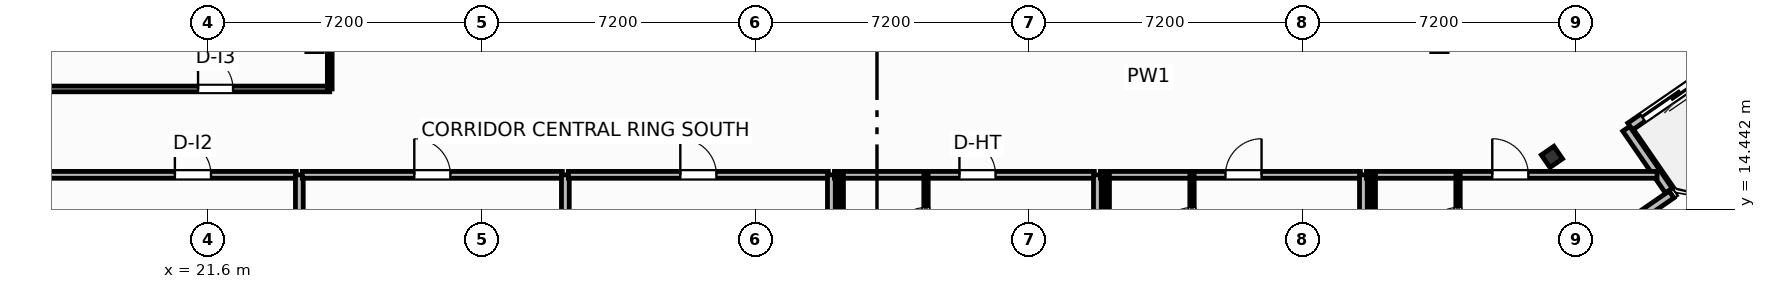
"""IFC4 building model, lengths in metres.
Left out: names, types, materials, properties, quantities, classifications, styles, units other than length and angle.
Written with IfcOpenShell. Run it as: python <this file> out.ifc"""

import sys

from ifc_helpers import new_model, si_unit, direction, frame, frame_2d, origin, origin_2d, place, context, subcontext, project, spatial, rectangle, i_section, extrude, element, fill, save


model = new_model("IFC4")
c1 = context("Model", 3, precision=1e-05, world=origin(), true_north=direction((0.0, 1.0)))
c2 = subcontext(c1, "Body", "Model", "MODEL_VIEW")
j1 = project(units=[si_unit("LENGTHUNIT", "METRE"), si_unit("PLANEANGLEUNIT", "RADIAN")], contexts=[c1])
p1 = place(None, origin())
s1 = spatial("IfcSite", under=j1, at=p1, CompositionType="ELEMENT")
p2 = place(p1, origin())
s2 = spatial("IfcBuilding", under=s1, at=p2, CompositionType="ELEMENT")
p3 = place(p2, frame((0.0, 0.0, 265.6)))
s3 = spatial("IfcBuildingStorey", under=s2, at=p3, CompositionType="ELEMENT", Elevation=265.6)
p4 = place(p3, frame((56.96, 15.823, 0.0), z_axis=(0.0, 0.0, 1.0), x_axis=(0.823532597628, 0.567268949127, 0.0)))
e1 = element("IfcColumn", 1, at=p4, inside=s3, PredefinedType="COLUMN", context=c2, shape_type="SweptSolid", body=[
    extrude(i_section(OverallWidth=0.401, OverallDepth=0.399, WebThickness=0.025, FlangeThickness=0.04, FilletRadius=0.022, at=origin_2d()), origin(), (0.0, 0.0, 1.0), 3.7),
])
p5 = place(p3, frame((63.605, 19.78, 0.0), z_axis=(0.0, 0.0, 1.0), x_axis=(-0.823541290762, -0.567256328665, 0.0)))
e2 = element("IfcWall", 2, at=p5, inside=s3, PredefinedType="SOLIDWALL", context=c2, shape_type="SweptSolid", body=[
    extrude(rectangle(XDim=5.567, YDim=0.22, at=frame_2d((2.784, 0.0))), origin(), (0.0, 0.0, 1.0), 2.73),
])
p6 = place(p5, frame((3.067, 0.0, 0.0)))
e3 = element("IfcOpeningElement", 3, at=p6, cuts=e2, PredefinedType="OPENING", context=c2, shape_type="SweptSolid", body=[
    extrude(rectangle(XDim=2.1, YDim=2.3, at=frame_2d((1.05, 1.15))), frame((0.0, 0.12, 0.0), z_axis=(0.0, -1.0, 0.0), x_axis=(1.0, 0.0, 0.0)), (0.0, 0.0, 1.0), 0.24),
])
p7 = place(p3, frame((53.49, 10.275, 0.0), z_axis=(0.0, 0.0, 1.0), x_axis=(0.823530942962, 0.56727135128, 0.0)))
e4 = element("IfcWall", 4, at=p7, inside=s3, PredefinedType="SOLIDWALL", context=c2, shape_type="SweptSolid", body=[
    extrude(rectangle(XDim=8.035, YDim=0.22, at=frame_2d((4.018, 0.0))), origin(), (0.0, 0.0, 1.0), 2.73),
])
p8 = place(p7, frame((2.968, 0.0, 0.8)))
e5 = element("IfcOpeningElement", 5, at=p8, cuts=e4, PredefinedType="OPENING", context=c2, shape_type="SweptSolid", body=[
    extrude(rectangle(XDim=2.1, YDim=1.75, at=frame_2d((1.05, 0.875))), frame((0.0, 0.12, 0.0), z_axis=(0.0, -1.0, 0.0), x_axis=(1.0, 0.0, 0.0)), (0.0, 0.0, 1.0), 0.24),
])
p9 = place(p3, frame((60.036, 14.936, 0.0), z_axis=(0.0, 0.0, 1.0), x_axis=(-0.567273565974, 0.823529417415, 0.0)))
e6 = element("IfcWall", 6, at=p9, inside=s3, PredefinedType="SOLIDWALL", context=c2, shape_type="SweptSolid", body=[
    extrude(rectangle(XDim=1.975, YDim=0.22, at=frame_2d((0.988, 0.0))), origin(), (0.0, 0.0, 1.0), 2.73),
])
p10 = place(p3, frame((5.0, 17.61, 0.0), z_axis=(0.0, 0.0, 1.0), x_axis=(1.0, 0.0, 0.0)))
e7 = element("IfcWall", 7, at=p10, inside=s3, PredefinedType="PARTITIONING", context=c2, shape_type="SweptSolid", body=[
    extrude(rectangle(XDim=19.8, YDim=0.15, at=frame_2d((9.9, 0.0))), origin(), (0.0, 0.0, 1.0), 2.739),
])
p11 = place(p10, frame((16.335, 0.0, 0.0)))
e8 = element("IfcOpeningElement", 8, at=p11, cuts=e7, PredefinedType="OPENING", context=c2, shape_type="SweptSolid", body=[
    extrude(rectangle(XDim=0.92, YDim=2.05, at=frame_2d((0.46, 1.025))), frame((0.0, 0.085, 0.0), z_axis=(0.0, -1.0, 0.0), x_axis=(1.0, 0.0, 0.0)), (0.0, 0.0, 1.0), 0.17),
])
p12 = place(p3, frame((24.8, 17.61, 0.0), z_axis=(0.0, 0.0, 1.0), x_axis=(0.0, 1.0, 0.0)))
e9 = element("IfcWall", 9, at=p12, inside=s3, PredefinedType="PARTITIONING", context=c2, shape_type="SweptSolid", body=[
    extrude(rectangle(XDim=1.63, YDim=0.125, at=frame_2d((0.815, 0.0))), origin(), (0.0, 0.0, 1.0), 3.45),
])
p13 = place(p3, frame((6.071, 15.35, 0.0), z_axis=(0.0, 0.0, 1.0), x_axis=(1.0, 0.0, 0.0)))
e10 = element("IfcWall", 10, at=p13, inside=s3, PredefinedType="PARTITIONING", context=c2, shape_type="SweptSolid", body=[
    extrude(rectangle(XDim=17.849, YDim=0.18, at=frame_2d((8.924, 0.0))), origin(), (0.0, 0.0, 1.0), 3.45),
])
p14 = place(p13, frame((14.654, 0.0, 0.0)))
e11 = element("IfcOpeningElement", 11, at=p14, cuts=e10, PredefinedType="OPENING", context=c2, shape_type="SweptSolid", body=[
    extrude(rectangle(XDim=0.95, YDim=2.05, at=frame_2d((0.475, 1.025))), frame((0.0, 0.1, 0.0), z_axis=(0.0, -1.0, 0.0), x_axis=(1.0, 0.0, 0.0)), (0.0, 0.0, 1.0), 0.2),
])
p15 = place(p3, frame((24.0, -4.0, 0.0), z_axis=(0.0, 0.0, 1.0), x_axis=(0.0, 1.0, 0.0)))
e12 = element("IfcWall", 12, at=p15, inside=s3, PredefinedType="PARTITIONING", context=c2, shape_type="SweptSolid", body=[
    extrude(rectangle(XDim=19.35, YDim=0.205, at=frame_2d((9.675, 0.0))), origin(), (0.0, 0.0, 1.0), 3.45),
])
p16 = place(p3, frame((24.08, 15.35, 0.0), z_axis=(0.0, 0.0, 1.0), x_axis=(1.0, 0.0, 0.0)))
e13 = element("IfcWall", 13, at=p16, inside=s3, PredefinedType="PARTITIONING", context=c2, shape_type="SweptSolid", body=[
    extrude(rectangle(XDim=6.84, YDim=0.18, at=frame_2d((3.42, 0.0))), origin(), (0.0, 0.0, 1.0), 3.45),
])
p17 = place(p16, frame((2.945, 0.0, 0.0)))
e14 = element("IfcOpeningElement", 14, at=p17, cuts=e13, PredefinedType="OPENING", context=c2, shape_type="SweptSolid", body=[
    extrude(rectangle(XDim=0.95, YDim=2.05, at=frame_2d((0.475, 1.025))), frame((0.0, 0.1, 0.0), z_axis=(0.0, -1.0, 0.0), x_axis=(1.0, 0.0, 0.0)), (0.0, 0.0, 1.0), 0.2),
])
p18 = place(p3, frame((31.0, -5.112, 0.0), z_axis=(0.0, 0.0, 1.0), x_axis=(0.0, 1.0, 0.0)))
e15 = element("IfcWall", 15, at=p18, inside=s3, PredefinedType="PARTITIONING", context=c2, shape_type="SweptSolid", body=[
    extrude(rectangle(XDim=20.462, YDim=0.205, at=frame_2d((10.231, 0.0))), origin(), (0.0, 0.0, 1.0), 3.45),
])
p19 = place(p3, frame((31.08, 15.35, 0.0), z_axis=(0.0, 0.0, 1.0), x_axis=(1.0, 0.0, 0.0)))
e16 = element("IfcWall", 16, at=p19, inside=s3, PredefinedType="PARTITIONING", context=c2, shape_type="SweptSolid", body=[
    extrude(rectangle(XDim=6.84, YDim=0.18, at=frame_2d((3.42, 0.0))), origin(), (0.0, 0.0, 1.0), 3.45),
])
p20 = place(p19, frame((2.945, 0.0, 0.0)))
e17 = element("IfcOpeningElement", 17, at=p20, cuts=e16, PredefinedType="OPENING", context=c2, shape_type="SweptSolid", body=[
    extrude(rectangle(XDim=0.95, YDim=2.05, at=frame_2d((0.475, 1.025))), frame((0.0, 0.1, 0.0), z_axis=(0.0, -1.0, 0.0), x_axis=(1.0, 0.0, 0.0)), (0.0, 0.0, 1.0), 0.2),
])
p21 = place(p3, frame((38.0, 2.179, 0.0), z_axis=(0.0, 0.0, 1.0), x_axis=(0.0, 1.0, 0.0)))
e18 = element("IfcWall", 18, at=p21, inside=s3, PredefinedType="PARTITIONING", context=c2, shape_type="SweptSolid", body=[
    extrude(rectangle(XDim=13.171, YDim=0.205, at=frame_2d((6.585, 0.0))), origin(), (0.0, 0.0, 1.0), 3.45),
])
p22 = place(p3, frame((38.08, 15.35, 0.0), z_axis=(0.0, 0.0, 1.0), x_axis=(1.0, 0.0, 0.0)))
e19 = element("IfcWall", 19, at=p22, inside=s3, PredefinedType="PARTITIONING", context=c2, shape_type="SweptSolid", body=[
    extrude(rectangle(XDim=6.84, YDim=0.18, at=frame_2d((3.42, 0.0))), origin(), (0.0, 0.0, 1.0), 3.45),
])
p23 = place(p22, frame((3.29, 0.0, 0.0)))
e20 = element("IfcOpeningElement", 20, at=p23, cuts=e19, PredefinedType="OPENING", context=c2, shape_type="SweptSolid", body=[
    extrude(rectangle(XDim=0.95, YDim=2.15, at=frame_2d((0.475, 1.075))), frame((0.0, 0.1, 0.0), z_axis=(0.0, -1.0, 0.0), x_axis=(1.0, 0.0, 0.0)), (0.0, 0.0, 1.0), 0.2),
])
p24 = place(p3, frame((40.49, 12.83, 0.0), z_axis=(0.0, 0.0, 1.0), x_axis=(0.0, 1.0, 0.0)))
e21 = element("IfcWall", 21, at=p24, inside=s3, PredefinedType="PARTITIONING", context=c2, shape_type="SweptSolid", body=[
    extrude(rectangle(XDim=2.52, YDim=0.115, at=frame_2d((1.26, 0.0))), origin(), (0.0, 0.0, 1.0), 3.45),
])
p25 = place(p24, frame((0.76, 0.0, 0.0)))
e22 = element("IfcOpeningElement", 22, at=p25, cuts=e21, PredefinedType="OPENING", context=c2, shape_type="SweptSolid", body=[
    extrude(rectangle(XDim=0.9, YDim=2.05, at=frame_2d((0.45, 1.025))), frame((0.0, 0.067, 0.0), z_axis=(0.0, -1.0, 0.0), x_axis=(1.0, 0.0, 0.0)), (0.0, 0.0, 1.0), 0.135),
])
p26 = place(p3, frame((38.26, 12.83, 0.0), z_axis=(0.0, 0.0, 1.0), x_axis=(0.0, 1.0, 0.0)))
e23 = element("IfcWall", 23, at=p26, inside=s3, PredefinedType="PARTITIONING", context=c2, shape_type="SweptSolid", body=[
    extrude(rectangle(XDim=2.52, YDim=0.115, at=frame_2d((1.26, 0.0))), origin(), (0.0, 0.0, 1.0), 3.45),
])
p27 = place(p3, frame((45.0, 4.451, 0.0), z_axis=(0.0, 0.0, 1.0), x_axis=(0.0, 1.0, 0.0)))
e24 = element("IfcWall", 24, at=p27, inside=s3, PredefinedType="PARTITIONING", context=c2, shape_type="SweptSolid", body=[
    extrude(rectangle(XDim=10.899, YDim=0.205, at=frame_2d((5.45, 0.0))), origin(), (0.0, 0.0, 1.0), 3.45),
])
p28 = place(p3, frame((45.08, 15.35, 0.0), z_axis=(0.0, 0.0, 1.0), x_axis=(1.0, 0.0, 0.0)))
e25 = element("IfcWall", 25, at=p28, inside=s3, PredefinedType="PARTITIONING", context=c2, shape_type="SweptSolid", body=[
    extrude(rectangle(XDim=6.84, YDim=0.18, at=frame_2d((3.42, 0.0))), origin(), (0.0, 0.0, 1.0), 3.45),
])
p29 = place(p28, frame((3.29, 0.0, 0.0)))
e26 = element("IfcOpeningElement", 26, at=p29, cuts=e25, PredefinedType="OPENING", context=c2, shape_type="SweptSolid", body=[
    extrude(rectangle(XDim=0.95, YDim=2.15, at=frame_2d((0.475, 1.075))), frame((0.0, 0.1, 0.0), z_axis=(0.0, -1.0, 0.0), x_axis=(1.0, 0.0, 0.0)), (0.0, 0.0, 1.0), 0.2),
])
p30 = place(p3, frame((47.49, 12.83, 0.0), z_axis=(0.0, 0.0, 1.0), x_axis=(0.0, 1.0, 0.0)))
e27 = element("IfcWall", 27, at=p30, inside=s3, PredefinedType="PARTITIONING", context=c2, shape_type="SweptSolid", body=[
    extrude(rectangle(XDim=2.52, YDim=0.115, at=frame_2d((1.26, 0.0))), origin(), (0.0, 0.0, 1.0), 3.45),
])
p31 = place(p30, frame((0.76, 0.0, 0.0)))
e28 = element("IfcOpeningElement", 28, at=p31, cuts=e27, PredefinedType="OPENING", context=c2, shape_type="SweptSolid", body=[
    extrude(rectangle(XDim=0.9, YDim=2.05, at=frame_2d((0.45, 1.025))), frame((0.0, 0.067, 0.0), z_axis=(0.0, -1.0, 0.0), x_axis=(1.0, 0.0, 0.0)), (0.0, 0.0, 1.0), 0.135),
])
p32 = place(p3, frame((45.26, 12.83, 0.0), z_axis=(0.0, 0.0, 1.0), x_axis=(0.0, 1.0, 0.0)))
e29 = element("IfcWall", 29, at=p32, inside=s3, PredefinedType="PARTITIONING", context=c2, shape_type="SweptSolid", body=[
    extrude(rectangle(XDim=2.52, YDim=0.115, at=frame_2d((1.26, 0.0))), origin(), (0.0, 0.0, 1.0), 3.45),
])
p33 = place(p3, frame((52.0, 11.823, 0.0), z_axis=(0.0, 0.0, 1.0), x_axis=(0.0, 1.0, 0.0)))
e30 = element("IfcWall", 30, at=p33, inside=s3, PredefinedType="PARTITIONING", context=c2, shape_type="SweptSolid", body=[
    extrude(rectangle(XDim=3.527, YDim=0.205, at=frame_2d((1.764, 0.0))), origin(), (0.0, 0.0, 1.0), 3.45),
])
p34 = place(p3, frame((52.08, 15.35, 0.0), z_axis=(0.0, 0.0, 1.0), x_axis=(1.0, 0.0, 0.0)))
e31 = element("IfcWall", 31, at=p34, inside=s3, PredefinedType="PARTITIONING", context=c2, shape_type="SweptSolid", body=[
    extrude(rectangle(XDim=7.646, YDim=0.18, at=frame_2d((3.823, 0.0))), origin(), (0.0, 0.0, 1.0), 3.45),
])
p35 = place(p34, frame((3.311, 0.0, 0.0)))
e32 = element("IfcOpeningElement", 32, at=p35, cuts=e31, PredefinedType="OPENING", context=c2, shape_type="SweptSolid", body=[
    extrude(rectangle(XDim=0.95, YDim=2.15, at=frame_2d((0.475, 1.075))), frame((0.0, 0.1, 0.0), z_axis=(0.0, -1.0, 0.0), x_axis=(1.0, 0.0, 0.0)), (0.0, 0.0, 1.0), 0.2),
])
p36 = place(p3, frame((54.49, 12.83, 0.0), z_axis=(0.0, 0.0, 1.0), x_axis=(0.0, 1.0, 0.0)))
e33 = element("IfcWall", 33, at=p36, inside=s3, PredefinedType="PARTITIONING", context=c2, shape_type="SweptSolid", body=[
    extrude(rectangle(XDim=2.52, YDim=0.115, at=frame_2d((1.26, 0.0))), origin(), (0.0, 0.0, 1.0), 3.45),
])
p37 = place(p36, frame((0.76, 0.0, 0.0)))
e34 = element("IfcOpeningElement", 34, at=p37, cuts=e33, PredefinedType="OPENING", context=c2, shape_type="SweptSolid", body=[
    extrude(rectangle(XDim=0.9, YDim=2.05, at=frame_2d((0.45, 1.025))), frame((0.0, 0.067, 0.0), z_axis=(0.0, -1.0, 0.0), x_axis=(1.0, 0.0, 0.0)), (0.0, 0.0, 1.0), 0.135),
])
p38 = place(p3, frame((52.26, 12.83, 0.0), z_axis=(0.0, 0.0, 1.0), x_axis=(0.0, 1.0, 0.0)))
e35 = element("IfcWall", 35, at=p38, inside=s3, PredefinedType="PARTITIONING", context=c2, shape_type="SweptSolid", body=[
    extrude(rectangle(XDim=2.52, YDim=0.115, at=frame_2d((1.26, 0.0))), origin(), (0.0, 0.0, 1.0), 3.45),
])
p39 = place(p6, origin())
e36 = element("IfcDoor", 36, at=p39, inside=s3, OperationType="SLIDING_TO_LEFT", PredefinedType="DOOR", context=c2, shape_type="SweptSolid", body=[
    extrude(rectangle(XDim=2.1, YDim=2.3, at=frame_2d((1.05, 1.15))), frame((0.0, 0.025, 0.0), z_axis=(0.0, -1.0, 0.0), x_axis=(1.0, 0.0, 0.0)), (0.0, 0.0, 1.0), 0.05),
])
fill(e3, e36)
p40 = place(p11, origin())
e37 = element("IfcDoor", 37, at=p40, inside=s3, OperationType="SINGLE_SWING_LEFT", PredefinedType="DOOR", context=c2, shape_type="SweptSolid", body=[
    extrude(rectangle(XDim=0.92, YDim=2.05, at=frame_2d((0.46, 1.025))), frame((0.0, 0.025, 0.0), z_axis=(0.0, -1.0, 0.0), x_axis=(1.0, 0.0, 0.0)), (0.0, 0.0, 1.0), 0.05),
])
fill(e8, e37)
p41 = place(p14, origin())
e38 = element("IfcDoor", 38, at=p41, inside=s3, OperationType="SINGLE_SWING_LEFT", PredefinedType="DOOR", context=c2, shape_type="SweptSolid", body=[
    extrude(rectangle(XDim=0.95, YDim=2.05, at=frame_2d((0.475, 1.025))), frame((0.0, 0.025, 0.0), z_axis=(0.0, -1.0, 0.0), x_axis=(1.0, 0.0, 0.0)), (0.0, 0.0, 1.0), 0.05),
])
fill(e11, e38)
p42 = place(p17, origin())
e39 = element("IfcDoor", 39, at=p42, inside=s3, OperationType="SINGLE_SWING_LEFT", PredefinedType="DOOR", context=c2, shape_type="SweptSolid", body=[
    extrude(rectangle(XDim=0.95, YDim=2.05, at=frame_2d((0.475, 1.025))), frame((0.0, 0.025, 0.0), z_axis=(0.0, -1.0, 0.0), x_axis=(1.0, 0.0, 0.0)), (0.0, 0.0, 1.0), 0.05),
])
fill(e14, e39)
p43 = place(p20, origin())
e40 = element("IfcDoor", 40, at=p43, inside=s3, OperationType="SINGLE_SWING_LEFT", PredefinedType="DOOR", context=c2, shape_type="SweptSolid", body=[
    extrude(rectangle(XDim=0.95, YDim=2.05, at=frame_2d((0.475, 1.025))), frame((0.0, 0.025, 0.0), z_axis=(0.0, -1.0, 0.0), x_axis=(1.0, 0.0, 0.0)), (0.0, 0.0, 1.0), 0.05),
])
fill(e17, e40)
p44 = place(p23, origin())
e41 = element("IfcDoor", 41, at=p44, inside=s3, OperationType="SINGLE_SWING_LEFT", PredefinedType="DOOR", context=c2, shape_type="SweptSolid", body=[
    extrude(rectangle(XDim=0.95, YDim=2.15, at=frame_2d((0.475, 1.075))), frame((0.0, 0.025, 0.0), z_axis=(0.0, -1.0, 0.0), x_axis=(1.0, 0.0, 0.0)), (0.0, 0.0, 1.0), 0.05),
])
fill(e20, e41)
p45 = place(p25, origin())
e42 = element("IfcDoor", 42, at=p45, inside=s3, OperationType="SINGLE_SWING_LEFT", PredefinedType="DOOR", context=c2, shape_type="SweptSolid", body=[
    extrude(rectangle(XDim=0.9, YDim=2.05, at=frame_2d((0.45, 1.025))), frame((0.0, 0.025, 0.0), z_axis=(0.0, -1.0, 0.0), x_axis=(1.0, 0.0, 0.0)), (0.0, 0.0, 1.0), 0.05),
])
fill(e22, e42)
p46 = place(p29, origin())
e43 = element("IfcDoor", 43, at=p46, inside=s3, OperationType="SINGLE_SWING_RIGHT", PredefinedType="DOOR", context=c2, shape_type="SweptSolid", body=[
    extrude(rectangle(XDim=0.95, YDim=2.15, at=frame_2d((0.475, 1.075))), frame((0.0, 0.025, 0.0), z_axis=(0.0, -1.0, 0.0), x_axis=(1.0, 0.0, 0.0)), (0.0, 0.0, 1.0), 0.05),
])
fill(e26, e43)
p47 = place(p31, origin())
e44 = element("IfcDoor", 44, at=p47, inside=s3, OperationType="SINGLE_SWING_LEFT", PredefinedType="DOOR", context=c2, shape_type="SweptSolid", body=[
    extrude(rectangle(XDim=0.9, YDim=2.05, at=frame_2d((0.45, 1.025))), frame((0.0, 0.025, 0.0), z_axis=(0.0, -1.0, 0.0), x_axis=(1.0, 0.0, 0.0)), (0.0, 0.0, 1.0), 0.05),
])
fill(e28, e44)
p48 = place(p35, origin())
e45 = element("IfcDoor", 45, at=p48, inside=s3, OperationType="SINGLE_SWING_LEFT", PredefinedType="DOOR", context=c2, shape_type="SweptSolid", body=[
    extrude(rectangle(XDim=0.95, YDim=2.15, at=frame_2d((0.475, 1.075))), frame((0.0, 0.025, 0.0), z_axis=(0.0, -1.0, 0.0), x_axis=(1.0, 0.0, 0.0)), (0.0, 0.0, 1.0), 0.05),
])
fill(e32, e45)
p49 = place(p37, origin())
e46 = element("IfcDoor", 46, at=p49, inside=s3, OperationType="SINGLE_SWING_LEFT", PredefinedType="DOOR", context=c2, shape_type="SweptSolid", body=[
    extrude(rectangle(XDim=0.9, YDim=2.05, at=frame_2d((0.45, 1.025))), frame((0.0, 0.025, 0.0), z_axis=(0.0, -1.0, 0.0), x_axis=(1.0, 0.0, 0.0)), (0.0, 0.0, 1.0), 0.05),
])
fill(e34, e46)
save(model, sys.argv[1])
